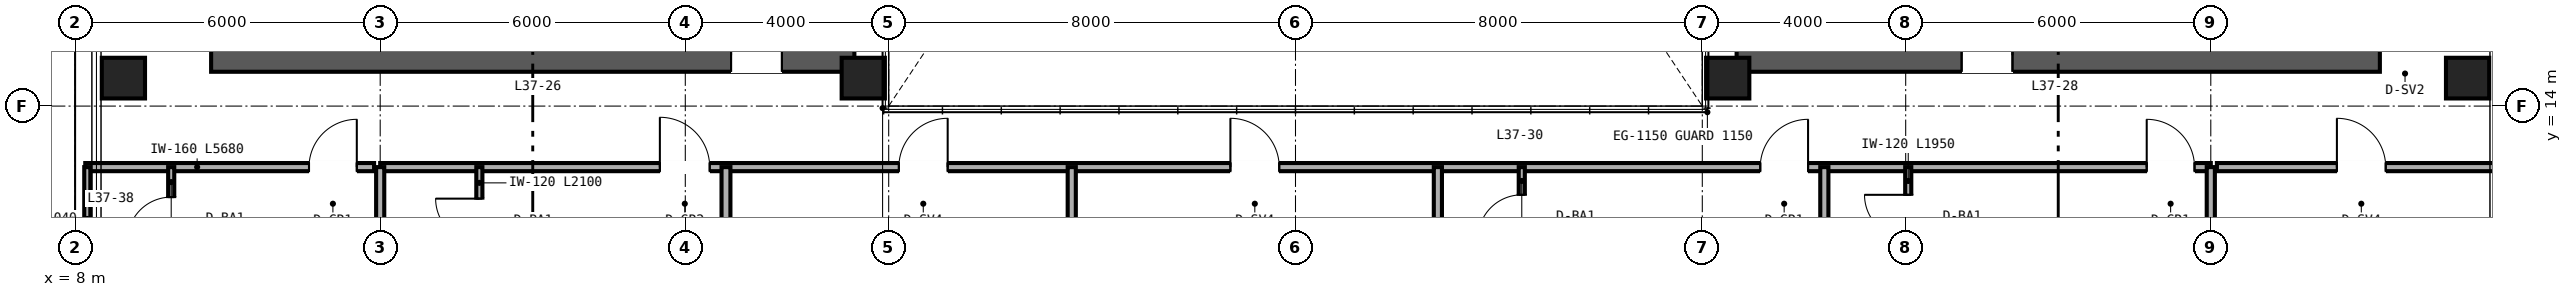
"""IFC4 building model, lengths in metres.
Left out: names, types, materials, properties, quantities, classifications, styles, units other than length and angle.
Written with IfcOpenShell. Run it as: python <this file> out.ifc"""

import sys

from ifc_helpers import new_model, si_unit, direction, frame, frame_2d, origin, origin_2d, place, context, subcontext, project, spatial, rectangle, hollow_rectangle, extrude, source, transform, mapped, element, fill, save


model = new_model("IFC4")
c1 = context("Model", 3, precision=1e-05, world=origin(), true_north=direction((0.0, 1.0)))
c2 = subcontext(c1, "Body", "Model", "MODEL_VIEW")
j1 = project(units=[si_unit("LENGTHUNIT", "METRE"), si_unit("PLANEANGLEUNIT", "RADIAN")], contexts=[c1])
p1 = place(None, origin())
s1 = spatial("IfcSite", under=j1, at=p1, CompositionType="ELEMENT")
p2 = place(p1, origin())
s2 = spatial("IfcBuilding", under=s1, at=p2, CompositionType="ELEMENT")
p3 = place(p2, frame((0.0, 0.0, 147.6)))
s3 = spatial("IfcBuildingStorey", under=s2, at=p3, CompositionType="ELEMENT", Elevation=147.6)
p4 = place(p3, frame((10.675, 15.0, 0.0), z_axis=(0.0, 0.0, 1.0), x_axis=(1.0, 0.0, 0.0)))
e1 = element("IfcWall", 1, at=p4, inside=s3, PredefinedType="SHEAR", context=c2, shape_type="SweptSolid", body=[
    extrude(rectangle(XDim=12.65, YDim=0.65, at=frame_2d((6.325, 0.0))), origin(), (0.0, 0.0, 1.0), 3.28),
])
p5 = place(p4, frame((10.225, 0.0, 0.0)))
e2 = element("IfcOpeningElement", 2, at=p5, cuts=e1, PredefinedType="OPENING", context=c2, shape_type="SweptSolid", body=[
    extrude(rectangle(XDim=1.0, YDim=2.15, at=frame_2d((0.5, 1.075))), frame((0.0, 0.335, 0.0), z_axis=(0.0, -1.0, 0.0), x_axis=(1.0, 0.0, 0.0)), (0.0, 0.0, 1.0), 0.67),
])
p6 = place(p3, frame((40.675, 15.0, 0.0), z_axis=(0.0, 0.0, 1.0), x_axis=(1.0, 0.0, 0.0)))
e3 = element("IfcWall", 3, at=p6, inside=s3, PredefinedType="SHEAR", context=c2, shape_type="SweptSolid", body=[
    extrude(rectangle(XDim=12.65, YDim=0.65, at=frame_2d((6.325, 0.0))), origin(), (0.0, 0.0, 1.0), 3.28),
])
p7 = place(p6, frame((4.425, 0.0, 0.0)))
e4 = element("IfcOpeningElement", 4, at=p7, cuts=e3, PredefinedType="OPENING", context=c2, shape_type="SweptSolid", body=[
    extrude(rectangle(XDim=1.0, YDim=2.15, at=frame_2d((0.5, 1.075))), frame((0.0, 0.335, 0.0), z_axis=(0.0, -1.0, 0.0), x_axis=(1.0, 0.0, 0.0)), (0.0, 0.0, 1.0), 0.67),
])
m1 = source(origin(), c2, "Body", "SweptSolid", [
    extrude(hollow_rectangle(XDim=0.85, YDim=0.8, WallThickness=0.032, at=origin_2d()), origin(), (0.0, 0.0, 1.0), 3.28),
])
for number, where, z_axis, x_axis in (
    (5, (8.95, 14.55, 0.0), (0.0, 0.0, 1.0), (1.0, 0.0, 0.0)),
    (6, (23.5, 14.55, 0.0), (0.0, 0.0, 1.0), (1.0, 0.0, 0.0)),
    (7, (40.5, 14.55, 0.0), (0.0, 0.0, 1.0), (1.0, 0.0, 0.0)),
    (8, (55.05, 14.55, 0.0), (0.0, 0.0, 1.0), (1.0, 0.0, 0.0)),
):
    element("IfcColumn", number, at=place(p3, frame(where, z_axis=z_axis, x_axis=x_axis)), inside=s3, PredefinedType="COLUMN", context=c2, shape_type="MappedRepresentation", body=[
        mapped(m1, transform((0.0, 0.0, 0.0), scale=1.0)),
    ])
p8 = place(p3, frame((8.2, 12.8, 0.0), z_axis=(0.0, 0.0, 1.0), x_axis=(1.0, 0.0, 0.0)))
e9 = element("IfcWall", 9, at=p8, inside=s3, PredefinedType="PARTITIONING", context=c2, shape_type="SweptSolid", body=[
    extrude(rectangle(XDim=5.68, YDim=0.16, at=frame_2d((2.84, 0.0))), origin(), (0.0, 0.0, 1.0), 3.28),
])
p9 = place(p8, frame((4.4, 0.0, 0.0)))
e10 = element("IfcOpeningElement", 10, at=p9, cuts=e9, PredefinedType="OPENING", context=c2, shape_type="SweptSolid", body=[
    extrude(rectangle(XDim=0.94, YDim=2.15, at=frame_2d((0.47, 1.075))), frame((0.0, 0.09, 0.0), z_axis=(0.0, -1.0, 0.0), x_axis=(1.0, 0.0, 0.0)), (0.0, 0.0, 1.0), 0.18),
])
p10 = place(p3, frame((9.89, 10.76, 0.0), z_axis=(0.0, 0.0, 1.0), x_axis=(0.0, 1.0, 0.0)))
e11 = element("IfcWall", 11, at=p10, inside=s3, PredefinedType="PARTITIONING", context=c2, shape_type="SweptSolid", body=[
    extrude(rectangle(XDim=2.04, YDim=0.12, at=frame_2d((1.02, 0.0))), origin(), (0.0, 0.0, 1.0), 3.28),
])
p11 = place(p10, frame((0.59, 0.0, 0.0)))
e12 = element("IfcOpeningElement", 12, at=p11, cuts=e11, PredefinedType="OPENING", context=c2, shape_type="SweptSolid", body=[
    extrude(rectangle(XDim=0.86, YDim=2.1, at=frame_2d((0.43, 1.05))), frame((0.0, 0.07, 0.0), z_axis=(0.0, -1.0, 0.0), x_axis=(1.0, 0.0, 0.0)), (0.0, 0.0, 1.0), 0.14),
])
p12 = place(p3, frame((8.24, 10.76, 0.0), z_axis=(0.0, 0.0, 1.0), x_axis=(0.0, 1.0, 0.0)))
e13 = element("IfcWall", 13, at=p12, inside=s3, PredefinedType="PARTITIONING", context=c2, shape_type="SweptSolid", body=[
    extrude(rectangle(XDim=2.04, YDim=0.12, at=frame_2d((1.02, 0.0))), origin(), (0.0, 0.0, 1.0), 3.28),
])
p13 = place(p3, frame((50.12, 12.8, 0.0), z_axis=(0.0, 0.0, 1.0), x_axis=(1.0, 0.0, 0.0)))
e14 = element("IfcWall", 14, at=p13, inside=s3, PredefinedType="PARTITIONING", context=c2, shape_type="SweptSolid", body=[
    extrude(rectangle(XDim=5.68, YDim=0.16, at=frame_2d((2.84, 0.0))), origin(), (0.0, 0.0, 1.0), 3.28),
])
p14 = place(p13, frame((2.36, 0.0, 0.0)))
e15 = element("IfcOpeningElement", 15, at=p14, cuts=e14, PredefinedType="OPENING", context=c2, shape_type="SweptSolid", body=[
    extrude(rectangle(XDim=0.96, YDim=2.15, at=frame_2d((0.48, 1.075))), frame((0.0, 0.09, 0.0), z_axis=(0.0, -1.0, 0.0), x_axis=(1.0, 0.0, 0.0)), (0.0, 0.0, 1.0), 0.18),
])
p15 = place(p3, frame((14.0, 12.8, 0.0), z_axis=(0.0, 0.0, 1.0), x_axis=(1.0, 0.0, 0.0)))
e16 = element("IfcWall", 16, at=p15, inside=s3, PredefinedType="PARTITIONING", context=c2, shape_type="SweptSolid", body=[
    extrude(rectangle(XDim=36.0, YDim=0.16, at=frame_2d((18.0, 0.0))), origin(), (0.0, 0.0, 1.0), 2.501),
])
p16 = place(p15, frame((5.5, 0.0, 0.0)))
e17 = element("IfcOpeningElement", 17, at=p16, cuts=e16, PredefinedType="OPENING", context=c2, shape_type="SweptSolid", body=[
    extrude(rectangle(XDim=0.98, YDim=2.2, at=frame_2d((0.49, 1.1))), frame((0.0, 0.09, 0.0), z_axis=(0.0, -1.0, 0.0), x_axis=(1.0, 0.0, 0.0)), (0.0, 0.0, 1.0), 0.18),
])
p17 = place(p15, frame((10.2, 0.0, 0.0)))
e18 = element("IfcOpeningElement", 18, at=p17, cuts=e16, PredefinedType="OPENING", context=c2, shape_type="SweptSolid", body=[
    extrude(rectangle(XDim=0.96, YDim=2.15, at=frame_2d((0.48, 1.075))), frame((0.0, 0.09, 0.0), z_axis=(0.0, -1.0, 0.0), x_axis=(1.0, 0.0, 0.0)), (0.0, 0.0, 1.0), 0.18),
])
p18 = place(p15, frame((16.72, 0.0, 0.0)))
e19 = element("IfcOpeningElement", 19, at=p18, cuts=e16, PredefinedType="OPENING", context=c2, shape_type="SweptSolid", body=[
    extrude(rectangle(XDim=0.96, YDim=2.15, at=frame_2d((0.48, 1.075))), frame((0.0, 0.09, 0.0), z_axis=(0.0, -1.0, 0.0), x_axis=(1.0, 0.0, 0.0)), (0.0, 0.0, 1.0), 0.18),
])
p19 = place(p15, frame((27.14, 0.0, 0.0)))
e20 = element("IfcOpeningElement", 20, at=p19, cuts=e16, PredefinedType="OPENING", context=c2, shape_type="SweptSolid", body=[
    extrude(rectangle(XDim=0.94, YDim=2.15, at=frame_2d((0.47, 1.075))), frame((0.0, 0.09, 0.0), z_axis=(0.0, -1.0, 0.0), x_axis=(1.0, 0.0, 0.0)), (0.0, 0.0, 1.0), 0.18),
])
p20 = place(p15, frame((34.74, 0.0, 0.0)))
e21 = element("IfcOpeningElement", 21, at=p20, cuts=e16, PredefinedType="OPENING", context=c2, shape_type="SweptSolid", body=[
    extrude(rectangle(XDim=0.94, YDim=2.15, at=frame_2d((0.47, 1.075))), frame((0.0, 0.09, 0.0), z_axis=(0.0, -1.0, 0.0), x_axis=(1.0, 0.0, 0.0)), (0.0, 0.0, 1.0), 0.18),
])
for number, where, z_axis, x_axis in (
    (22, (14.0, 2.36, 0.0), (0.0, 0.0, 1.0), (0.0, 1.0, 0.0)),
    (23, (50.0, 2.36, 0.0), (0.0, 0.0, 1.0), (0.0, 1.0, 0.0)),
):
    element("IfcWall", number, at=place(p3, frame(where, z_axis=z_axis, x_axis=x_axis)), inside=s3, PredefinedType="PARTITIONING", context=c2, shape_type="SweptSolid", body=[
        extrude(rectangle(XDim=10.44, YDim=0.16, at=frame_2d((5.22, 0.0))), origin(), (0.0, 0.0, 1.0), 2.587),
    ])
p21 = place(p3, frame((20.8, 2.36, 0.0), z_axis=(0.0, 0.0, 1.0), x_axis=(0.0, 1.0, 0.0)))
e24 = element("IfcWall", 24, at=p21, inside=s3, PredefinedType="PARTITIONING", context=c2, shape_type="SweptSolid", body=[
    extrude(rectangle(XDim=10.44, YDim=0.175, at=frame_2d((5.22, 0.0))), origin(), (0.0, 0.0, 1.0), 2.743),
])
p22 = place(p3, frame((15.95, 10.7, 0.0), z_axis=(0.0, 0.0, 1.0), x_axis=(0.0, 1.0, 0.0)))
e25 = element("IfcWall", 25, at=p22, inside=s3, PredefinedType="PARTITIONING", context=c2, shape_type="SweptSolid", body=[
    extrude(rectangle(XDim=2.1, YDim=0.12, at=frame_2d((1.05, 0.0))), origin(), (0.0, 0.0, 1.0), 3.28),
])
p23 = place(p22, frame((0.62, 0.0, 0.0)))
e26 = element("IfcOpeningElement", 26, at=p23, cuts=e25, PredefinedType="OPENING", context=c2, shape_type="SweptSolid", body=[
    extrude(rectangle(XDim=0.86, YDim=2.1, at=frame_2d((0.43, 1.05))), frame((0.0, 0.07, 0.0), z_axis=(0.0, -1.0, 0.0), x_axis=(1.0, 0.0, 0.0)), (0.0, 0.0, 1.0), 0.14),
])
for number, where, z_axis, x_axis in (
    (27, (27.6, 2.36, 0.0), (0.0, 0.0, 1.0), (0.0, 1.0, 0.0)),
    (28, (34.8, 2.36, 0.0), (0.0, 0.0, 1.0), (0.0, 1.0, 0.0)),
):
    element("IfcWall", number, at=place(p3, frame(where, z_axis=z_axis, x_axis=x_axis)), inside=s3, PredefinedType="PARTITIONING", context=c2, shape_type="SweptSolid", body=[
        extrude(rectangle(XDim=10.44, YDim=0.16, at=frame_2d((5.22, 0.0))), origin(), (0.0, 0.0, 1.0), 2.36),
    ])
p24 = place(p3, frame((42.4, 2.36, 0.0), z_axis=(0.0, 0.0, 1.0), x_axis=(0.0, 1.0, 0.0)))
e29 = element("IfcWall", 29, at=p24, inside=s3, PredefinedType="PARTITIONING", context=c2, shape_type="SweptSolid", body=[
    extrude(rectangle(XDim=10.44, YDim=0.16, at=frame_2d((5.22, 0.0))), origin(), (0.0, 0.0, 1.0), 2.743),
])
p25 = place(p3, frame((36.45, 10.85, 0.0), z_axis=(0.0, 0.0, 1.0), x_axis=(0.0, 1.0, 0.0)))
e30 = element("IfcWall", 30, at=p25, inside=s3, PredefinedType="PARTITIONING", context=c2, shape_type="SweptSolid", body=[
    extrude(rectangle(XDim=1.95, YDim=0.12, at=frame_2d((0.975, 0.0))), origin(), (0.0, 0.0, 1.0), 3.28),
])
p26 = place(p25, frame((0.545, 0.0, 0.0)))
e31 = element("IfcOpeningElement", 31, at=p26, cuts=e30, PredefinedType="OPENING", context=c2, shape_type="SweptSolid", body=[
    extrude(rectangle(XDim=0.86, YDim=2.1, at=frame_2d((0.43, 1.05))), frame((0.0, 0.07, 0.0), z_axis=(0.0, -1.0, 0.0), x_axis=(1.0, 0.0, 0.0)), (0.0, 0.0, 1.0), 0.14),
])
p27 = place(p3, frame((44.05, 10.85, 0.0), z_axis=(0.0, 0.0, 1.0), x_axis=(0.0, 1.0, 0.0)))
e32 = element("IfcWall", 32, at=p27, inside=s3, PredefinedType="PARTITIONING", context=c2, shape_type="SweptSolid", body=[
    extrude(rectangle(XDim=1.95, YDim=0.12, at=frame_2d((0.975, 0.0))), origin(), (0.0, 0.0, 1.0), 3.28),
])
p28 = place(p27, frame((0.545, 0.0, 0.0)))
e33 = element("IfcOpeningElement", 33, at=p28, cuts=e32, PredefinedType="OPENING", context=c2, shape_type="SweptSolid", body=[
    extrude(rectangle(XDim=0.86, YDim=2.1, at=frame_2d((0.43, 1.05))), frame((0.0, 0.07, 0.0), z_axis=(0.0, -1.0, 0.0), x_axis=(1.0, 0.0, 0.0)), (0.0, 0.0, 1.0), 0.14),
])
m2 = source(origin(), c2, "Body", "SweptSolid", [
    extrude(rectangle(XDim=1.0, YDim=2.15, at=frame_2d((0.5, 1.075))), frame((0.0, 0.025, 0.0), z_axis=(0.0, -1.0, 0.0), x_axis=(1.0, 0.0, 0.0)), (0.0, 0.0, 1.0), 0.05),
])
p29 = place(p5, origin())
e34 = element("IfcDoor", 34, at=p29, inside=s3, OperationType="SINGLE_SWING_LEFT", PredefinedType="DOOR", context=c2, shape_type="MappedRepresentation", body=[
    mapped(m2, transform((0.0, 0.0, 0.0), scale=1.0)),
])
fill(e2, e34)
p30 = place(p7, origin())
e35 = element("IfcDoor", 35, at=p30, inside=s3, OperationType="SINGLE_SWING_RIGHT", PredefinedType="DOOR", context=c2, shape_type="MappedRepresentation", body=[
    mapped(m2, transform((0.0, 0.0, 0.0), scale=1.0)),
])
fill(e4, e35)
m3 = source(origin(), c2, "Body", "SweptSolid", [
    extrude(rectangle(XDim=0.86, YDim=2.1, at=frame_2d((0.43, 1.05))), frame((0.0, 0.025, 0.0), z_axis=(0.0, -1.0, 0.0), x_axis=(1.0, 0.0, 0.0)), (0.0, 0.0, 1.0), 0.05),
])
p31 = place(p11, origin())
e36 = element("IfcDoor", 36, at=p31, inside=s3, OperationType="SINGLE_SWING_LEFT", PredefinedType="DOOR", context=c2, shape_type="MappedRepresentation", body=[
    mapped(m3, transform((0.0, 0.0, 0.0), scale=1.0)),
])
fill(e12, e36)
m4 = source(origin(), c2, "Body", "SweptSolid", [
    extrude(rectangle(XDim=0.94, YDim=2.15, at=frame_2d((0.47, 1.075))), frame((0.0, 0.025, 0.0), z_axis=(0.0, -1.0, 0.0), x_axis=(1.0, 0.0, 0.0)), (0.0, 0.0, 1.0), 0.05),
])
p32 = place(p9, origin())
e37 = element("IfcDoor", 37, at=p32, inside=s3, OperationType="SINGLE_SWING_RIGHT", PredefinedType="DOOR", context=c2, shape_type="MappedRepresentation", body=[
    mapped(m4, transform((0.0, 0.0, 0.0), scale=1.0)),
])
fill(e10, e37)
m5 = source(origin(), c2, "Body", "SweptSolid", [
    extrude(rectangle(XDim=0.96, YDim=2.15, at=frame_2d((0.48, 1.075))), frame((0.0, 0.025, 0.0), z_axis=(0.0, -1.0, 0.0), x_axis=(1.0, 0.0, 0.0)), (0.0, 0.0, 1.0), 0.05),
])
p33 = place(p14, origin())
e38 = element("IfcDoor", 38, at=p33, inside=s3, OperationType="SINGLE_SWING_LEFT", PredefinedType="DOOR", context=c2, shape_type="MappedRepresentation", body=[
    mapped(m5, transform((0.0, 0.0, 0.0), scale=1.0)),
])
fill(e15, e38)
p34 = place(p23, origin())
e39 = element("IfcDoor", 39, at=p34, inside=s3, OperationType="SINGLE_SWING_RIGHT", PredefinedType="DOOR", context=c2, shape_type="MappedRepresentation", body=[
    mapped(m3, transform((0.0, 0.0, 0.0), scale=1.0)),
])
fill(e26, e39)
p35 = place(p26, origin())
e40 = element("IfcDoor", 40, at=p35, inside=s3, OperationType="SINGLE_SWING_LEFT", PredefinedType="DOOR", context=c2, shape_type="MappedRepresentation", body=[
    mapped(m3, transform((0.0, 0.0, 0.0), scale=1.0)),
])
fill(e31, e40)
p36 = place(p28, origin())
e41 = element("IfcDoor", 41, at=p36, inside=s3, OperationType="SINGLE_SWING_RIGHT", PredefinedType="DOOR", context=c2, shape_type="MappedRepresentation", body=[
    mapped(m3, transform((0.0, 0.0, 0.0), scale=1.0)),
])
fill(e33, e41)
m6 = source(origin(), c2, "Body", "SweptSolid", [
    extrude(rectangle(XDim=0.98, YDim=2.2, at=frame_2d((0.49, 1.1))), frame((0.0, 0.025, 0.0), z_axis=(0.0, -1.0, 0.0), x_axis=(1.0, 0.0, 0.0)), (0.0, 0.0, 1.0), 0.05),
])
p37 = place(p16, origin())
e42 = element("IfcDoor", 42, at=p37, inside=s3, OperationType="SINGLE_SWING_LEFT", PredefinedType="DOOR", context=c2, shape_type="MappedRepresentation", body=[
    mapped(m6, transform((0.0, 0.0, 0.0), scale=1.0)),
])
fill(e17, e42)
p38 = place(p17, origin())
e43 = element("IfcDoor", 43, at=p38, inside=s3, OperationType="SINGLE_SWING_RIGHT", PredefinedType="DOOR", context=c2, shape_type="MappedRepresentation", body=[
    mapped(m5, transform((0.0, 0.0, 0.0), scale=1.0)),
])
fill(e18, e43)
p39 = place(p18, origin())
e44 = element("IfcDoor", 44, at=p39, inside=s3, OperationType="SINGLE_SWING_LEFT", PredefinedType="DOOR", context=c2, shape_type="MappedRepresentation", body=[
    mapped(m5, transform((0.0, 0.0, 0.0), scale=1.0)),
])
fill(e19, e44)
p40 = place(p19, origin())
e45 = element("IfcDoor", 45, at=p40, inside=s3, OperationType="SINGLE_SWING_RIGHT", PredefinedType="DOOR", context=c2, shape_type="MappedRepresentation", body=[
    mapped(m4, transform((0.0, 0.0, 0.0), scale=1.0)),
])
fill(e20, e45)
p41 = place(p20, origin())
e46 = element("IfcDoor", 46, at=p41, inside=s3, OperationType="SINGLE_SWING_LEFT", PredefinedType="DOOR", context=c2, shape_type="MappedRepresentation", body=[
    mapped(m4, transform((0.0, 0.0, 0.0), scale=1.0)),
])
fill(e21, e46)
save(model, sys.argv[1])
